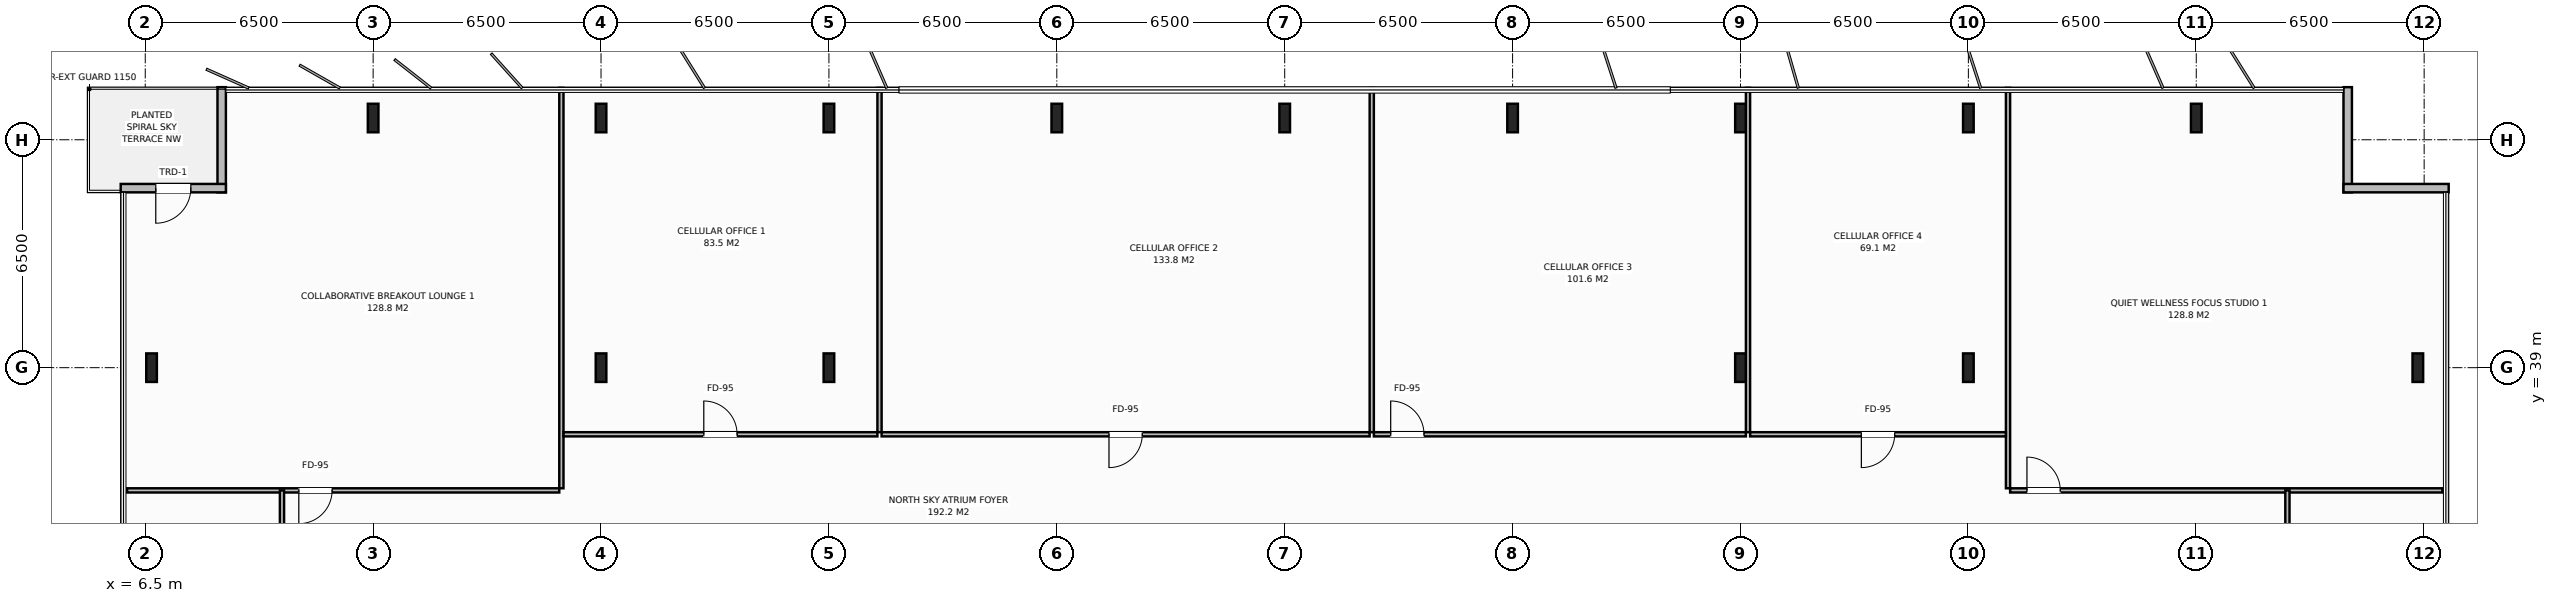
"""IFC4 building model, lengths in metres.
Left out: names, types, materials, properties, quantities, classifications, styles, units other than length and angle.
Written with IfcOpenShell. Run it as: python <this file> out.ifc"""

import sys

from ifc_helpers import new_model, si_unit, direction, frame, frame_2d, origin, origin_2d, place, context, subcontext, project, spatial, rectangle, i_section, extrude, element, fill, save


model = new_model("IFC4")
c1 = context("Model", 3, precision=1e-05, world=origin(), true_north=direction((0.0, 1.0)))
c2 = subcontext(c1, "Body", "Model", "MODEL_VIEW")
j1 = project(units=[si_unit("LENGTHUNIT", "METRE"), si_unit("PLANEANGLEUNIT", "RADIAN")], contexts=[c1])
p1 = place(None, origin())
s1 = spatial("IfcSite", under=j1, at=p1, CompositionType="ELEMENT")
p2 = place(p1, origin())
s2 = spatial("IfcBuilding", under=s1, at=p2, CompositionType="ELEMENT")
p3 = place(p2, frame((0.0, 0.0, 217.6)))
s3 = spatial("IfcBuildingStorey", under=s2, at=p3, CompositionType="ELEMENT", Elevation=217.6)
for number, where, z_axis, x_axis in (
    (1, (19.5, 39.0, 0.0), (0.0, 0.0, 1.0), (1.0, 0.0, 0.0)),
    (2, (58.5, 39.0, 0.0), (0.0, 0.0, 1.0), (1.0, 0.0, 0.0)),
    (3, (26.0, 39.0, 0.0), (0.0, 0.0, 1.0), (1.0, 0.0, 0.0)),
    (4, (52.0, 39.0, 0.0), (0.0, 0.0, 1.0), (1.0, 0.0, 0.0)),
    (5, (13.0, 46.12, 0.0), (0.0, 0.0, 1.0), (1.0, 0.0, 0.0)),
    (6, (19.5, 46.12, 0.0), (0.0, 0.0, 1.0), (1.0, 0.0, 0.0)),
    (7, (26.0, 46.12, 0.0), (0.0, 0.0, 1.0), (1.0, 0.0, 0.0)),
    (8, (32.5, 46.12, 0.0), (0.0, 0.0, 1.0), (1.0, 0.0, 0.0)),
    (9, (39.0, 46.12, 0.0), (0.0, 0.0, 1.0), (1.0, 0.0, 0.0)),
    (10, (45.5, 46.12, 0.0), (0.0, 0.0, 1.0), (1.0, 0.0, 0.0)),
    (11, (52.0, 46.12, 0.0), (0.0, 0.0, 1.0), (1.0, 0.0, 0.0)),
    (12, (58.5, 46.12, 0.0), (0.0, 0.0, 1.0), (1.0, 0.0, 0.0)),
    (13, (65.0, 46.12, 0.0), (0.0, 0.0, 1.0), (1.0, 0.0, 0.0)),
    (14, (6.68, 39.0, 0.0), (0.0, 0.0, 1.0), (1.0, 0.0, 0.0)),
    (15, (71.32, 39.0, 0.0), (0.0, 0.0, 1.0), (1.0, 0.0, 0.0)),
):
    element("IfcColumn", number, at=place(p3, frame(where, z_axis=z_axis, x_axis=x_axis)), inside=s3, PredefinedType="COLUMN", context=c2, shape_type="SweptSolid", body=[
        extrude(i_section(OverallWidth=0.303, OverallDepth=0.814, WebThickness=0.021, FlangeThickness=0.04, at=origin_2d()), origin(), (0.0, 0.0, 1.0), 3.8),
    ])
p4 = place(p3, frame((8.68, 44.0, 0.0), z_axis=(0.0, 0.0, 1.0), x_axis=(0.0, 1.0, 0.0)))
e16 = element("IfcWall", 16, at=p4, inside=s3, PredefinedType="STANDARD", context=c2, shape_type="SweptSolid", body=[
    extrude(rectangle(XDim=3.0, YDim=0.24, at=frame_2d((1.5, 0.0))), origin(), (0.0, 0.0, 1.0), 3.58),
])
p5 = place(p3, frame((5.8, 44.12, 0.0), z_axis=(0.0, 0.0, 1.0), x_axis=(1.0, 0.0, 0.0)))
e17 = element("IfcWall", 17, at=p5, inside=s3, PredefinedType="STANDARD", context=c2, shape_type="SweptSolid", body=[
    extrude(rectangle(XDim=3.0, YDim=0.24, at=frame_2d((1.5, 0.0))), origin(), (0.0, 0.0, 1.0), 3.58),
])
p6 = place(p5, frame((1.0, 0.0, 0.0)))
e18 = element("IfcOpeningElement", 18, at=p6, cuts=e17, PredefinedType="OPENING", context=c2, shape_type="SweptSolid", body=[
    extrude(rectangle(XDim=1.0, YDim=2.2, at=frame_2d((0.5, 1.1))), frame((0.0, 0.13, 0.0), z_axis=(0.0, -1.0, 0.0), x_axis=(1.0, 0.0, 0.0)), (0.0, 0.0, 1.0), 0.26),
])
for number, where, z_axis, x_axis in (
    (19, (69.32, 47.0, 0.0), (0.0, 0.0, 1.0), (0.0, -1.0, 0.0)),
    (20, (69.2, 44.12, 0.0), (0.0, 0.0, 1.0), (1.0, 0.0, 0.0)),
):
    element("IfcWall", number, at=place(p3, frame(where, z_axis=z_axis, x_axis=x_axis)), inside=s3, PredefinedType="STANDARD", context=c2, shape_type="SweptSolid", body=[
        extrude(rectangle(XDim=3.0, YDim=0.24, at=frame_2d((1.5, 0.0))), origin(), (0.0, 0.0, 1.0), 3.58),
    ])
p7 = place(p3, frame((18.369, 35.56, 0.0), z_axis=(0.0, 0.0, 1.0), x_axis=(0.0, 1.0, 0.0)))
e21 = element("IfcWall", 21, at=p7, inside=s3, PredefinedType="PARTITIONING", context=c2, shape_type="SweptSolid", body=[
    extrude(rectangle(XDim=11.42, YDim=0.12, at=frame_2d((5.71, 0.0))), origin(), (0.0, 0.0, 1.0), 3.58),
])
p8 = place(p3, frame((5.98, 35.5, 0.0), z_axis=(0.0, 0.0, 1.0), x_axis=(1.0, 0.0, 0.0)))
e22 = element("IfcWall", 22, at=p8, inside=s3, PredefinedType="PARTITIONING", context=c2, shape_type="SweptSolid", body=[
    extrude(rectangle(XDim=12.329, YDim=0.12, at=frame_2d((6.165, 0.0))), origin(), (0.0, 0.0, 1.0), 3.58),
])
p9 = place(p8, frame((4.9, 0.0, 0.0)))
e23 = element("IfcOpeningElement", 23, at=p9, cuts=e22, PredefinedType="OPENING", context=c2, shape_type="SweptSolid", body=[
    extrude(rectangle(XDim=0.95, YDim=2.15, at=frame_2d((0.475, 1.075))), frame((0.0, 0.07, 0.0), z_axis=(0.0, -1.0, 0.0), x_axis=(1.0, 0.0, 0.0)), (0.0, 0.0, 1.0), 0.14),
])
p10 = place(p3, frame((27.443, 37.16, 0.0), z_axis=(0.0, 0.0, 1.0), x_axis=(0.0, 1.0, 0.0)))
e24 = element("IfcWall", 24, at=p10, inside=s3, PredefinedType="PARTITIONING", context=c2, shape_type="SweptSolid", body=[
    extrude(rectangle(XDim=9.82, YDim=0.12, at=frame_2d((4.91, 0.0))), origin(), (0.0, 0.0, 1.0), 3.58),
])
p11 = place(p3, frame((18.429, 37.1, 0.0), z_axis=(0.0, 0.0, 1.0), x_axis=(1.0, 0.0, 0.0)))
e25 = element("IfcWall", 25, at=p11, inside=s3, PredefinedType="PARTITIONING", context=c2, shape_type="SweptSolid", body=[
    extrude(rectangle(XDim=8.954, YDim=0.12, at=frame_2d((4.477, 0.0))), origin(), (0.0, 0.0, 1.0), 3.58),
])
p12 = place(p11, frame((4.002, 0.0, 0.0)))
e26 = element("IfcOpeningElement", 26, at=p12, cuts=e25, PredefinedType="OPENING", context=c2, shape_type="SweptSolid", body=[
    extrude(rectangle(XDim=0.95, YDim=2.15, at=frame_2d((0.475, 1.075))), frame((0.0, 0.07, 0.0), z_axis=(0.0, -1.0, 0.0), x_axis=(1.0, 0.0, 0.0)), (0.0, 0.0, 1.0), 0.14),
])
p13 = place(p3, frame((41.483, 37.16, 0.0), z_axis=(0.0, 0.0, 1.0), x_axis=(0.0, 1.0, 0.0)))
e27 = element("IfcWall", 27, at=p13, inside=s3, PredefinedType="PARTITIONING", context=c2, shape_type="SweptSolid", body=[
    extrude(rectangle(XDim=9.82, YDim=0.12, at=frame_2d((4.91, 0.0))), origin(), (0.0, 0.0, 1.0), 3.58),
])
p14 = place(p3, frame((27.503, 37.1, 0.0), z_axis=(0.0, 0.0, 1.0), x_axis=(1.0, 0.0, 0.0)))
e28 = element("IfcWall", 28, at=p14, inside=s3, PredefinedType="PARTITIONING", context=c2, shape_type="SweptSolid", body=[
    extrude(rectangle(XDim=13.92, YDim=0.12, at=frame_2d((6.96, 0.0))), origin(), (0.0, 0.0, 1.0), 3.58),
])
p15 = place(p14, frame((6.485, 0.0, 0.0)))
e29 = element("IfcOpeningElement", 29, at=p15, cuts=e28, PredefinedType="OPENING", context=c2, shape_type="SweptSolid", body=[
    extrude(rectangle(XDim=0.95, YDim=2.15, at=frame_2d((0.475, 1.075))), frame((0.0, 0.07, 0.0), z_axis=(0.0, -1.0, 0.0), x_axis=(1.0, 0.0, 0.0)), (0.0, 0.0, 1.0), 0.14),
])
p16 = place(p3, frame((52.215, 37.16, 0.0), z_axis=(0.0, 0.0, 1.0), x_axis=(0.0, 1.0, 0.0)))
e30 = element("IfcWall", 30, at=p16, inside=s3, PredefinedType="PARTITIONING", context=c2, shape_type="SweptSolid", body=[
    extrude(rectangle(XDim=9.82, YDim=0.12, at=frame_2d((4.91, 0.0))), origin(), (0.0, 0.0, 1.0), 2.88),
])
p17 = place(p3, frame((41.543, 37.1, 0.0), z_axis=(0.0, 0.0, 1.0), x_axis=(1.0, 0.0, 0.0)))
e31 = element("IfcWall", 31, at=p17, inside=s3, PredefinedType="PARTITIONING", context=c2, shape_type="SweptSolid", body=[
    extrude(rectangle(XDim=10.611, YDim=0.12, at=frame_2d((5.306, 0.0))), origin(), (0.0, 0.0, 1.0), 3.58),
])
p18 = place(p17, frame((0.48, 0.0, 0.0)))
e32 = element("IfcOpeningElement", 32, at=p18, cuts=e31, PredefinedType="OPENING", context=c2, shape_type="SweptSolid", body=[
    extrude(rectangle(XDim=0.95, YDim=2.15, at=frame_2d((0.475, 1.075))), frame((0.0, 0.07, 0.0), z_axis=(0.0, -1.0, 0.0), x_axis=(1.0, 0.0, 0.0)), (0.0, 0.0, 1.0), 0.14),
])
p19 = place(p3, frame((59.631, 35.56, 0.0), z_axis=(0.0, 0.0, 1.0), x_axis=(0.0, 1.0, 0.0)))
e33 = element("IfcWall", 33, at=p19, inside=s3, PredefinedType="PARTITIONING", context=c2, shape_type="SweptSolid", body=[
    extrude(rectangle(XDim=11.42, YDim=0.12, at=frame_2d((5.71, 0.0))), origin(), (0.0, 0.0, 1.0), 3.58),
])
p20 = place(p3, frame((52.275, 37.1, 0.0), z_axis=(0.0, 0.0, 1.0), x_axis=(1.0, 0.0, 0.0)))
e34 = element("IfcWall", 34, at=p20, inside=s3, PredefinedType="PARTITIONING", context=c2, shape_type="SweptSolid", body=[
    extrude(rectangle(XDim=7.296, YDim=0.12, at=frame_2d((3.648, 0.0))), origin(), (0.0, 0.0, 1.0), 3.58),
])
p21 = place(p20, frame((3.173, 0.0, 0.0)))
e35 = element("IfcOpeningElement", 35, at=p21, cuts=e34, PredefinedType="OPENING", context=c2, shape_type="SweptSolid", body=[
    extrude(rectangle(XDim=0.95, YDim=2.15, at=frame_2d((0.475, 1.075))), frame((0.0, 0.07, 0.0), z_axis=(0.0, -1.0, 0.0), x_axis=(1.0, 0.0, 0.0)), (0.0, 0.0, 1.0), 0.14),
])
p22 = place(p3, frame((59.691, 35.5, 0.0), z_axis=(0.0, 0.0, 1.0), x_axis=(1.0, 0.0, 0.0)))
e36 = element("IfcWall", 36, at=p22, inside=s3, PredefinedType="PARTITIONING", context=c2, shape_type="SweptSolid", body=[
    extrude(rectangle(XDim=12.329, YDim=0.12, at=frame_2d((6.165, 0.0))), origin(), (0.0, 0.0, 1.0), 3.58),
])
p23 = place(p22, frame((0.48, 0.0, 0.0)))
e37 = element("IfcOpeningElement", 37, at=p23, cuts=e36, PredefinedType="OPENING", context=c2, shape_type="SweptSolid", body=[
    extrude(rectangle(XDim=0.95, YDim=2.15, at=frame_2d((0.475, 1.075))), frame((0.0, 0.07, 0.0), z_axis=(0.0, -1.0, 0.0), x_axis=(1.0, 0.0, 0.0)), (0.0, 0.0, 1.0), 0.14),
])
p24 = place(p3, frame((10.4, 27.05, 0.0), z_axis=(0.0, 0.0, 1.0), x_axis=(0.0, 1.0, 0.0)))
e38 = element("IfcWall", 38, at=p24, inside=s3, PredefinedType="PARTITIONING", context=c2, shape_type="SweptSolid", body=[
    extrude(rectangle(XDim=8.45, YDim=0.12, at=frame_2d((4.225, 0.0))), origin(), (0.0, 0.0, 1.0), 3.58),
])
p25 = place(p24, frame((2.7, 0.0, 0.0)))
e39 = element("IfcOpeningElement", 39, at=p25, cuts=e38, PredefinedType="OPENING", context=c2, shape_type="SweptSolid", body=[
    extrude(rectangle(XDim=0.95, YDim=2.15, at=frame_2d((0.475, 1.075))), frame((0.0, 0.07, 0.0), z_axis=(0.0, -1.0, 0.0), x_axis=(1.0, 0.0, 0.0)), (0.0, 0.0, 1.0), 0.14),
])
p26 = place(p3, frame((67.6, 16.5, 0.0), z_axis=(0.0, 0.0, 1.0), x_axis=(0.0, 1.0, 0.0)))
e40 = element("IfcWall", 40, at=p26, inside=s3, PredefinedType="PARTITIONING", context=c2, shape_type="SweptSolid", body=[
    extrude(rectangle(XDim=19.0, YDim=0.12, at=frame_2d((9.5, 0.0))), origin(), (0.0, 0.0, 1.0), 3.58),
])
p27 = place(p26, frame((9.025, 0.0, 0.0)))
e41 = element("IfcOpeningElement", 41, at=p27, cuts=e40, PredefinedType="OPENING", context=c2, shape_type="SweptSolid", body=[
    extrude(rectangle(XDim=0.95, YDim=2.15, at=frame_2d((0.475, 1.075))), frame((0.0, 0.07, 0.0), z_axis=(0.0, -1.0, 0.0), x_axis=(1.0, 0.0, 0.0)), (0.0, 0.0, 1.0), 0.14),
])
p28 = place(p6, origin())
e42 = element("IfcDoor", 42, at=p28, inside=s3, OperationType="SINGLE_SWING_RIGHT", PredefinedType="DOOR", context=c2, shape_type="SweptSolid", body=[
    extrude(rectangle(XDim=1.0, YDim=2.2, at=frame_2d((0.5, 1.1))), frame((0.0, 0.025, 0.0), z_axis=(0.0, -1.0, 0.0), x_axis=(1.0, 0.0, 0.0)), (0.0, 0.0, 1.0), 0.05),
])
fill(e18, e42)
p29 = place(p9, origin())
e43 = element("IfcDoor", 43, at=p29, inside=s3, OperationType="SINGLE_SWING_RIGHT", PredefinedType="DOOR", context=c2, shape_type="SweptSolid", body=[
    extrude(rectangle(XDim=0.95, YDim=2.15, at=frame_2d((0.475, 1.075))), frame((0.0, 0.025, 0.0), z_axis=(0.0, -1.0, 0.0), x_axis=(1.0, 0.0, 0.0)), (0.0, 0.0, 1.0), 0.05),
])
fill(e23, e43)
p30 = place(p12, origin())
e44 = element("IfcDoor", 44, at=p30, inside=s3, OperationType="SINGLE_SWING_LEFT", PredefinedType="DOOR", context=c2, shape_type="SweptSolid", body=[
    extrude(rectangle(XDim=0.95, YDim=2.15, at=frame_2d((0.475, 1.075))), frame((0.0, 0.025, 0.0), z_axis=(0.0, -1.0, 0.0), x_axis=(1.0, 0.0, 0.0)), (0.0, 0.0, 1.0), 0.05),
])
fill(e26, e44)
p31 = place(p15, origin())
e45 = element("IfcDoor", 45, at=p31, inside=s3, OperationType="SINGLE_SWING_RIGHT", PredefinedType="DOOR", context=c2, shape_type="SweptSolid", body=[
    extrude(rectangle(XDim=0.95, YDim=2.15, at=frame_2d((0.475, 1.075))), frame((0.0, 0.025, 0.0), z_axis=(0.0, -1.0, 0.0), x_axis=(1.0, 0.0, 0.0)), (0.0, 0.0, 1.0), 0.05),
])
fill(e29, e45)
p32 = place(p18, origin())
e46 = element("IfcDoor", 46, at=p32, inside=s3, OperationType="SINGLE_SWING_LEFT", PredefinedType="DOOR", context=c2, shape_type="SweptSolid", body=[
    extrude(rectangle(XDim=0.95, YDim=2.15, at=frame_2d((0.475, 1.075))), frame((0.0, 0.025, 0.0), z_axis=(0.0, -1.0, 0.0), x_axis=(1.0, 0.0, 0.0)), (0.0, 0.0, 1.0), 0.05),
])
fill(e32, e46)
p33 = place(p21, origin())
e47 = element("IfcDoor", 47, at=p33, inside=s3, OperationType="SINGLE_SWING_RIGHT", PredefinedType="DOOR", context=c2, shape_type="SweptSolid", body=[
    extrude(rectangle(XDim=0.95, YDim=2.15, at=frame_2d((0.475, 1.075))), frame((0.0, 0.025, 0.0), z_axis=(0.0, -1.0, 0.0), x_axis=(1.0, 0.0, 0.0)), (0.0, 0.0, 1.0), 0.05),
])
fill(e35, e47)
p34 = place(p23, origin())
e48 = element("IfcDoor", 48, at=p34, inside=s3, OperationType="SINGLE_SWING_LEFT", PredefinedType="DOOR", context=c2, shape_type="SweptSolid", body=[
    extrude(rectangle(XDim=0.95, YDim=2.15, at=frame_2d((0.475, 1.075))), frame((0.0, 0.025, 0.0), z_axis=(0.0, -1.0, 0.0), x_axis=(1.0, 0.0, 0.0)), (0.0, 0.0, 1.0), 0.05),
])
fill(e37, e48)
save(model, sys.argv[1])
